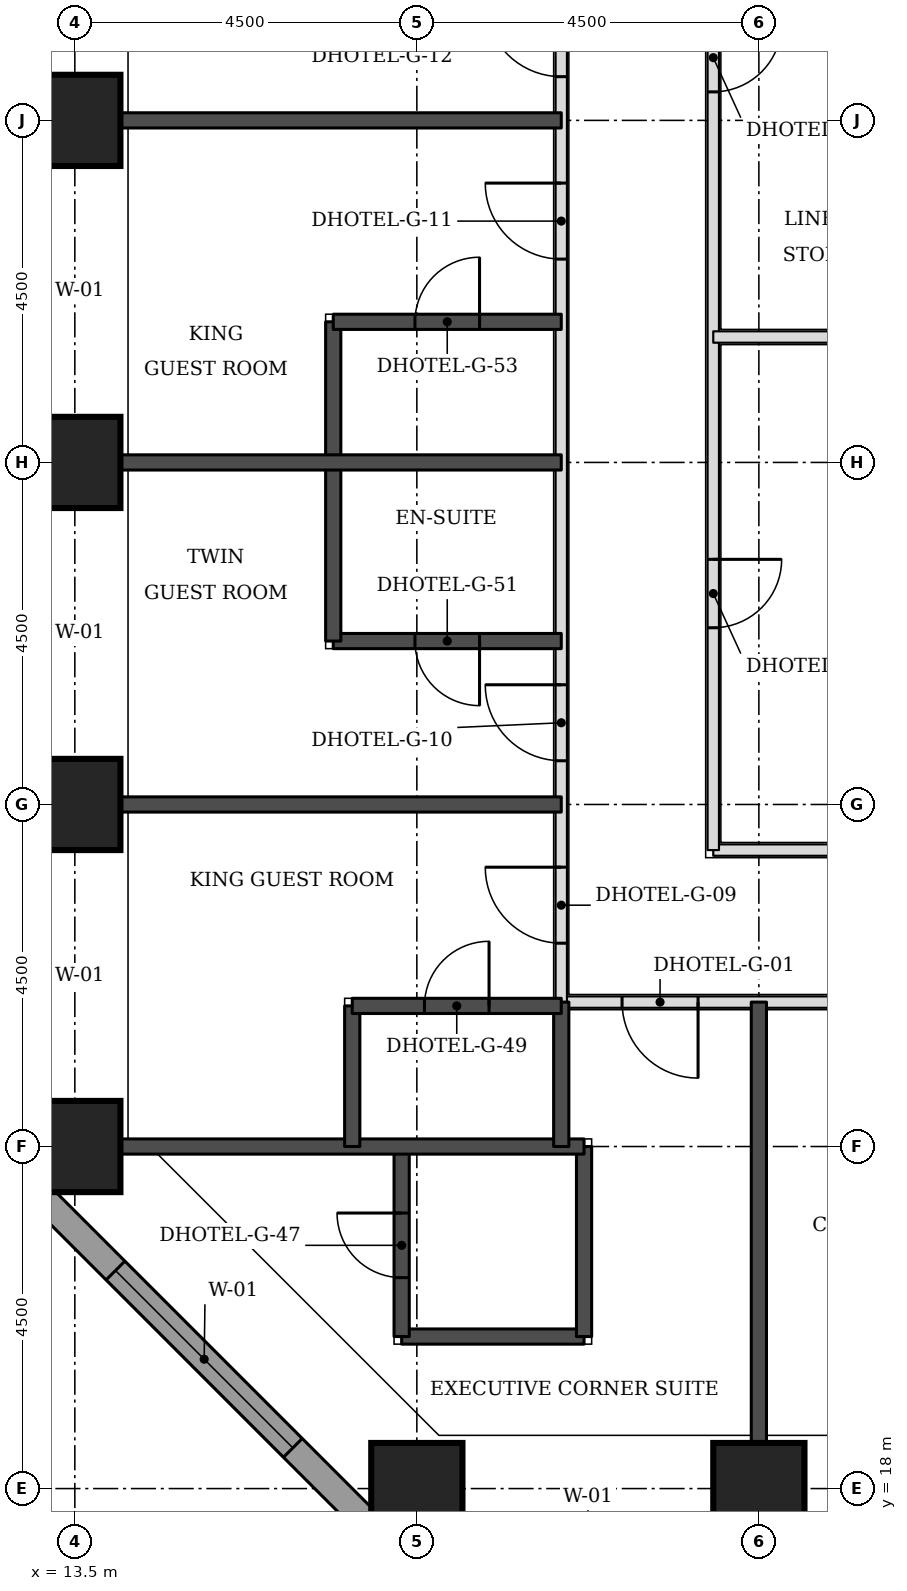
"""IFC4 building model, lengths in metres.
Left out: names, types, materials, properties, quantities, classifications, styles, units other than length and angle.
Written with IfcOpenShell. Run it as: python <this file> out.ifc"""

import sys

from ifc_helpers import new_model, si_unit, direction, frame, frame_2d, origin, origin_2d, place, context, subcontext, project, spatial, rectangle, extrude, element, fill, save


model = new_model("IFC4")
c1 = context("Model", 3, precision=1e-05, world=origin(), true_north=direction((0.0, 1.0)))
c2 = subcontext(c1, "Body", "Model", "MODEL_VIEW")
j1 = project(units=[si_unit("LENGTHUNIT", "METRE"), si_unit("PLANEANGLEUNIT", "RADIAN")], contexts=[c1])
p1 = place(None, origin())
s1 = spatial("IfcSite", under=j1, at=p1, CompositionType="ELEMENT")
p2 = place(p1, origin())
s2 = spatial("IfcBuilding", under=s1, at=p2, CompositionType="ELEMENT")
p3 = place(p2, frame((0.0, 0.0, 66.0)))
s3 = spatial("IfcBuildingStorey", under=s2, at=p3, CompositionType="ELEMENT", Elevation=66.0)
for number, where, z_axis, x_axis in (
    (1, (18.0, 18.0, 0.0), (0.0, 0.0, 1.0), (1.0, 0.0, 0.0)),
    (2, (22.5, 18.0, 0.0), (0.0, 0.0, 1.0), (1.0, 0.0, 0.0)),
    (3, (13.5, 22.5, 0.0), (0.0, 0.0, 1.0), (1.0, 0.0, 0.0)),
    (4, (13.5, 27.0, 0.0), (0.0, 0.0, 1.0), (1.0, 0.0, 0.0)),
    (5, (13.5, 31.5, 0.0), (0.0, 0.0, 1.0), (1.0, 0.0, 0.0)),
    (6, (13.5, 36.0, 0.0), (0.0, 0.0, 1.0), (1.0, 0.0, 0.0)),
):
    element("IfcColumn", number, at=place(p3, frame(where, z_axis=z_axis, x_axis=x_axis)), inside=s3, PredefinedType="COLUMN", context=c2, shape_type="SweptSolid", body=[
        extrude(rectangle(XDim=1.2, YDim=1.2, at=origin_2d()), origin(), (0.0, 0.0, 1.0), 3.3),
    ])
p4 = place(p3, frame((12.674, 22.23, 0.0), z_axis=(0.0, 0.0, 1.0), x_axis=(0.707106781187, -0.707106781187, 0.0)))
e7 = element("IfcWall", 7, at=p4, inside=s3, PredefinedType="STANDARD", context=c2, shape_type="SweptSolid", body=[
    extrude(rectangle(XDim=7.151, YDim=0.35, at=frame_2d((3.576, 0.0))), origin(), (0.0, 0.0, 1.0), 3.055),
])
p5 = place(p4, frame((1.926, 0.0, 0.8)))
e8 = element("IfcOpeningElement", 8, at=p5, cuts=e7, PredefinedType="OPENING", context=c2, shape_type="SweptSolid", body=[
    extrude(rectangle(XDim=3.3, YDim=1.5, at=frame_2d((1.65, 0.75))), frame((0.0, 0.185, 0.0), z_axis=(0.0, -1.0, 0.0), x_axis=(1.0, 0.0, 0.0)), (0.0, 0.0, 1.0), 0.37),
])
p6 = place(p3, frame((19.9, 24.4, 0.0), z_axis=(0.0, 0.0, 1.0), x_axis=(1.0, 0.0, 0.0)))
e9 = element("IfcWall", 9, at=p6, inside=s3, PredefinedType="PARTITIONING", context=c2, shape_type="SweptSolid", body=[
    extrude(rectangle(XDim=32.2, YDim=0.15, at=frame_2d((16.1, 0.0))), origin(), (0.0, 0.0, 1.0), 3.08),
])
p7 = place(p6, frame((4.4, 0.0, 0.0)))
e10 = element("IfcOpeningElement", 10, at=p7, cuts=e9, PredefinedType="OPENING", context=c2, shape_type="SweptSolid", body=[
    extrude(rectangle(XDim=0.9, YDim=2.1, at=frame_2d((0.45, 1.05))), frame((0.0, 0.085, 0.0), z_axis=(0.0, -1.0, 0.0), x_axis=(1.0, 0.0, 0.0)), (0.0, 0.0, 1.0), 0.17),
])
p8 = place(p6, frame((8.9, 0.0, 0.0)))
e11 = element("IfcOpeningElement", 11, at=p8, cuts=e9, PredefinedType="OPENING", context=c2, shape_type="SweptSolid", body=[
    extrude(rectangle(XDim=0.9, YDim=2.1, at=frame_2d((0.45, 1.05))), frame((0.0, 0.085, 0.0), z_axis=(0.0, -1.0, 0.0), x_axis=(1.0, 0.0, 0.0)), (0.0, 0.0, 1.0), 0.17),
])
p9 = place(p6, frame((13.4, 0.0, 0.0)))
e12 = element("IfcOpeningElement", 12, at=p9, cuts=e9, PredefinedType="OPENING", context=c2, shape_type="SweptSolid", body=[
    extrude(rectangle(XDim=0.9, YDim=2.1, at=frame_2d((0.45, 1.05))), frame((0.0, 0.085, 0.0), z_axis=(0.0, -1.0, 0.0), x_axis=(1.0, 0.0, 0.0)), (0.0, 0.0, 1.0), 0.17),
])
p10 = place(p6, frame((17.9, 0.0, 0.0)))
e13 = element("IfcOpeningElement", 13, at=p10, cuts=e9, PredefinedType="OPENING", context=c2, shape_type="SweptSolid", body=[
    extrude(rectangle(XDim=0.9, YDim=2.1, at=frame_2d((0.45, 1.05))), frame((0.0, 0.085, 0.0), z_axis=(0.0, -1.0, 0.0), x_axis=(1.0, 0.0, 0.0)), (0.0, 0.0, 1.0), 0.17),
])
p11 = place(p6, frame((22.4, 0.0, 0.0)))
e14 = element("IfcOpeningElement", 14, at=p11, cuts=e9, PredefinedType="OPENING", context=c2, shape_type="SweptSolid", body=[
    extrude(rectangle(XDim=0.9, YDim=2.1, at=frame_2d((0.45, 1.05))), frame((0.0, 0.085, 0.0), z_axis=(0.0, -1.0, 0.0), x_axis=(1.0, 0.0, 0.0)), (0.0, 0.0, 1.0), 0.17),
])
p12 = place(p6, frame((26.9, 0.0, 0.0)))
e15 = element("IfcOpeningElement", 15, at=p12, cuts=e9, PredefinedType="OPENING", context=c2, shape_type="SweptSolid", body=[
    extrude(rectangle(XDim=0.9, YDim=2.1, at=frame_2d((0.45, 1.05))), frame((0.0, 0.085, 0.0), z_axis=(0.0, -1.0, 0.0), x_axis=(1.0, 0.0, 0.0)), (0.0, 0.0, 1.0), 0.17),
])
p13 = place(p6, frame((0.8, 0.0, 0.0)))
e16 = element("IfcOpeningElement", 16, at=p13, cuts=e9, PredefinedType="OPENING", context=c2, shape_type="SweptSolid", body=[
    extrude(rectangle(XDim=1.0, YDim=2.1, at=frame_2d((0.5, 1.05))), frame((0.0, 0.085, 0.0), z_axis=(0.0, -1.0, 0.0), x_axis=(1.0, 0.0, 0.0)), (0.0, 0.0, 1.0), 0.17),
])
p14 = place(p6, frame((30.4, 0.0, 0.0)))
e17 = element("IfcOpeningElement", 17, at=p14, cuts=e9, PredefinedType="OPENING", context=c2, shape_type="SweptSolid", body=[
    extrude(rectangle(XDim=1.0, YDim=2.1, at=frame_2d((0.5, 1.05))), frame((0.0, 0.085, 0.0), z_axis=(0.0, -1.0, 0.0), x_axis=(1.0, 0.0, 0.0)), (0.0, 0.0, 1.0), 0.17),
])
p15 = place(p3, frame((19.9, 24.4, 0.0), z_axis=(0.0, 0.0, 1.0), x_axis=(0.0, 1.0, 0.0)))
e18 = element("IfcWall", 18, at=p15, inside=s3, PredefinedType="PARTITIONING", context=c2, shape_type="SweptSolid", body=[
    extrude(rectangle(XDim=25.1, YDim=0.15, at=frame_2d((12.55, 0.0))), origin(), (0.0, 0.0, 1.0), 3.08),
])
p16 = place(p15, frame((0.775, 0.0, 0.0)))
e19 = element("IfcOpeningElement", 19, at=p16, cuts=e18, PredefinedType="OPENING", context=c2, shape_type="SweptSolid", body=[
    extrude(rectangle(XDim=1.0, YDim=2.1, at=frame_2d((0.5, 1.05))), frame((0.0, 0.085, 0.0), z_axis=(0.0, -1.0, 0.0), x_axis=(1.0, 0.0, 0.0)), (0.0, 0.0, 1.0), 0.17),
])
p17 = place(p15, frame((3.175, 0.0, 0.0)))
e20 = element("IfcOpeningElement", 20, at=p17, cuts=e18, PredefinedType="OPENING", context=c2, shape_type="SweptSolid", body=[
    extrude(rectangle(XDim=1.0, YDim=2.1, at=frame_2d((0.5, 1.05))), frame((0.0, 0.085, 0.0), z_axis=(0.0, -1.0, 0.0), x_axis=(1.0, 0.0, 0.0)), (0.0, 0.0, 1.0), 0.17),
])
p18 = place(p15, frame((9.775, 0.0, 0.0)))
e21 = element("IfcOpeningElement", 21, at=p18, cuts=e18, PredefinedType="OPENING", context=c2, shape_type="SweptSolid", body=[
    extrude(rectangle(XDim=1.0, YDim=2.1, at=frame_2d((0.5, 1.05))), frame((0.0, 0.085, 0.0), z_axis=(0.0, -1.0, 0.0), x_axis=(1.0, 0.0, 0.0)), (0.0, 0.0, 1.0), 0.17),
])
p19 = place(p15, frame((12.175, 0.0, 0.0)))
e22 = element("IfcOpeningElement", 22, at=p19, cuts=e18, PredefinedType="OPENING", context=c2, shape_type="SweptSolid", body=[
    extrude(rectangle(XDim=1.0, YDim=2.1, at=frame_2d((0.5, 1.05))), frame((0.0, 0.085, 0.0), z_axis=(0.0, -1.0, 0.0), x_axis=(1.0, 0.0, 0.0)), (0.0, 0.0, 1.0), 0.17),
])
p20 = place(p15, frame((18.775, 0.0, 0.0)))
e23 = element("IfcOpeningElement", 23, at=p20, cuts=e18, PredefinedType="OPENING", context=c2, shape_type="SweptSolid", body=[
    extrude(rectangle(XDim=1.0, YDim=2.1, at=frame_2d((0.5, 1.05))), frame((0.0, 0.085, 0.0), z_axis=(0.0, -1.0, 0.0), x_axis=(1.0, 0.0, 0.0)), (0.0, 0.0, 1.0), 0.17),
])
p21 = place(p15, frame((21.175, 0.0, 0.0)))
e24 = element("IfcOpeningElement", 24, at=p21, cuts=e18, PredefinedType="OPENING", context=c2, shape_type="SweptSolid", body=[
    extrude(rectangle(XDim=1.0, YDim=2.1, at=frame_2d((0.5, 1.05))), frame((0.0, 0.085, 0.0), z_axis=(0.0, -1.0, 0.0), x_axis=(1.0, 0.0, 0.0)), (0.0, 0.0, 1.0), 0.17),
])
p22 = place(p3, frame((21.9, 26.4, 0.0), z_axis=(0.0, 0.0, 1.0), x_axis=(1.0, 0.0, 0.0)))
e25 = element("IfcWall", 25, at=p22, inside=s3, PredefinedType="PARTITIONING", context=c2, shape_type="SweptSolid", body=[
    extrude(rectangle(XDim=2.7, YDim=0.15, at=frame_2d((1.35, 0.0))), origin(), (0.0, 0.0, 1.0), 3.08),
])
p23 = place(p3, frame((21.9, 26.4, 0.0), z_axis=(0.0, 0.0, 1.0), x_axis=(0.0, 1.0, 0.0)))
e26 = element("IfcWall", 26, at=p23, inside=s3, PredefinedType="PARTITIONING", context=c2, shape_type="SweptSolid", body=[
    extrude(rectangle(XDim=16.6, YDim=0.15, at=frame_2d((8.3, 0.0))), origin(), (0.0, 0.0, 1.0), 3.08),
])
p24 = place(p23, frame((2.925, 0.0, 0.0)))
e27 = element("IfcOpeningElement", 27, at=p24, cuts=e26, PredefinedType="OPENING", context=c2, shape_type="SweptSolid", body=[
    extrude(rectangle(XDim=0.9, YDim=2.1, at=frame_2d((0.45, 1.05))), frame((0.0, 0.085, 0.0), z_axis=(0.0, -1.0, 0.0), x_axis=(1.0, 0.0, 0.0)), (0.0, 0.0, 1.0), 0.17),
])
p25 = place(p23, frame((9.975, 0.0, 0.0)))
e28 = element("IfcOpeningElement", 28, at=p25, cuts=e26, PredefinedType="OPENING", context=c2, shape_type="SweptSolid", body=[
    extrude(rectangle(XDim=0.9, YDim=2.1, at=frame_2d((0.45, 1.05))), frame((0.0, 0.085, 0.0), z_axis=(0.0, -1.0, 0.0), x_axis=(1.0, 0.0, 0.0)), (0.0, 0.0, 1.0), 0.17),
])
p26 = place(p3, frame((22.5, 18.6, 0.0), z_axis=(0.0, 0.0, 1.0), x_axis=(0.0, 1.0, 0.0)))
e29 = element("IfcWall", 29, at=p26, inside=s3, PredefinedType="SOLIDWALL", context=c2, shape_type="SweptSolid", body=[
    extrude(rectangle(XDim=5.8, YDim=0.2, at=frame_2d((2.9, 0.0))), origin(), (0.0, 0.0, 1.0), 3.08),
])
p27 = place(p3, frame((17.8, 20.0, 0.0), z_axis=(0.0, 0.0, 1.0), x_axis=(1.0, 0.0, 0.0)))
e30 = element("IfcWall", 30, at=p27, inside=s3, PredefinedType="SOLIDWALL", context=c2, shape_type="SweptSolid", body=[
    extrude(rectangle(XDim=2.4, YDim=0.2, at=frame_2d((1.2, 0.0))), origin(), (0.0, 0.0, 1.0), 3.08),
])
p28 = place(p3, frame((17.8, 20.0, 0.0), z_axis=(0.0, 0.0, 1.0), x_axis=(0.0, 1.0, 0.0)))
e31 = element("IfcWall", 31, at=p28, inside=s3, PredefinedType="SOLIDWALL", context=c2, shape_type="SweptSolid", body=[
    extrude(rectangle(XDim=2.5, YDim=0.2, at=frame_2d((1.25, 0.0))), origin(), (0.0, 0.0, 1.0), 3.08),
])
p29 = place(p28, frame((0.775, 0.0, 0.0)))
e32 = element("IfcOpeningElement", 32, at=p29, cuts=e31, PredefinedType="OPENING", context=c2, shape_type="SweptSolid", body=[
    extrude(rectangle(XDim=0.85, YDim=2.1, at=frame_2d((0.425, 1.05))), frame((0.0, 0.11, 0.0), z_axis=(0.0, -1.0, 0.0), x_axis=(1.0, 0.0, 0.0)), (0.0, 0.0, 1.0), 0.22),
])
p30 = place(p3, frame((20.2, 20.0, 0.0), z_axis=(0.0, 0.0, 1.0), x_axis=(0.0, 1.0, 0.0)))
e33 = element("IfcWall", 33, at=p30, inside=s3, PredefinedType="SOLIDWALL", context=c2, shape_type="SweptSolid", body=[
    extrude(rectangle(XDim=2.5, YDim=0.2, at=frame_2d((1.25, 0.0))), origin(), (0.0, 0.0, 1.0), 3.08),
])
p31 = place(p3, frame((14.1, 22.5, 0.0), z_axis=(0.0, 0.0, 1.0), x_axis=(1.0, 0.0, 0.0)))
e34 = element("IfcWall", 34, at=p31, inside=s3, PredefinedType="SOLIDWALL", context=c2, shape_type="SweptSolid", body=[
    extrude(rectangle(XDim=6.1, YDim=0.2, at=frame_2d((3.05, 0.0))), origin(), (0.0, 0.0, 1.0), 3.08),
])
p32 = place(p3, frame((17.15, 22.5, 0.0), z_axis=(0.0, 0.0, 1.0), x_axis=(0.0, 1.0, 0.0)))
e35 = element("IfcWall", 35, at=p32, inside=s3, PredefinedType="SOLIDWALL", context=c2, shape_type="SweptSolid", body=[
    extrude(rectangle(XDim=1.85, YDim=0.2, at=frame_2d((0.925, 0.0))), origin(), (0.0, 0.0, 1.0), 3.08),
])
p33 = place(p3, frame((19.9, 22.5, 0.0), z_axis=(0.0, 0.0, 1.0), x_axis=(0.0, 1.0, 0.0)))
e36 = element("IfcWall", 36, at=p33, inside=s3, PredefinedType="SOLIDWALL", context=c2, shape_type="SweptSolid", body=[
    extrude(rectangle(XDim=1.9, YDim=0.2, at=frame_2d((0.95, 0.0))), origin(), (0.0, 0.0, 1.0), 3.08),
])
p34 = place(p3, frame((17.15, 24.35, 0.0), z_axis=(0.0, 0.0, 1.0), x_axis=(1.0, 0.0, 0.0)))
e37 = element("IfcWall", 37, at=p34, inside=s3, PredefinedType="SOLIDWALL", context=c2, shape_type="SweptSolid", body=[
    extrude(rectangle(XDim=2.75, YDim=0.2, at=frame_2d((1.375, 0.0))), origin(), (0.0, 0.0, 1.0), 3.08),
])
p35 = place(p34, frame((0.95, 0.0, 0.0)))
e38 = element("IfcOpeningElement", 38, at=p35, cuts=e37, PredefinedType="OPENING", context=c2, shape_type="SweptSolid", body=[
    extrude(rectangle(XDim=0.85, YDim=2.1, at=frame_2d((0.425, 1.05))), frame((0.0, 0.11, 0.0), z_axis=(0.0, -1.0, 0.0), x_axis=(1.0, 0.0, 0.0)), (0.0, 0.0, 1.0), 0.22),
])
p36 = place(p3, frame((14.1, 27.0, 0.0), z_axis=(0.0, 0.0, 1.0), x_axis=(1.0, 0.0, 0.0)))
e39 = element("IfcWall", 39, at=p36, inside=s3, PredefinedType="SOLIDWALL", context=c2, shape_type="SweptSolid", body=[
    extrude(rectangle(XDim=5.8, YDim=0.2, at=frame_2d((2.9, 0.0))), origin(), (0.0, 0.0, 1.0), 3.08),
])
p37 = place(p3, frame((16.9, 29.15, 0.0), z_axis=(0.0, 0.0, 1.0), x_axis=(1.0, 0.0, 0.0)))
e40 = element("IfcWall", 40, at=p37, inside=s3, PredefinedType="SOLIDWALL", context=c2, shape_type="SweptSolid", body=[
    extrude(rectangle(XDim=3.0, YDim=0.2, at=frame_2d((1.5, 0.0))), origin(), (0.0, 0.0, 1.0), 3.08),
])
p38 = place(p37, frame((1.075, 0.0, 0.0)))
e41 = element("IfcOpeningElement", 41, at=p38, cuts=e40, PredefinedType="OPENING", context=c2, shape_type="SweptSolid", body=[
    extrude(rectangle(XDim=0.85, YDim=2.1, at=frame_2d((0.425, 1.05))), frame((0.0, 0.11, 0.0), z_axis=(0.0, -1.0, 0.0), x_axis=(1.0, 0.0, 0.0)), (0.0, 0.0, 1.0), 0.22),
])
p39 = place(p3, frame((16.9, 29.15, 0.0), z_axis=(0.0, 0.0, 1.0), x_axis=(0.0, 1.0, 0.0)))
e42 = element("IfcWall", 42, at=p39, inside=s3, PredefinedType="SOLIDWALL", context=c2, shape_type="SweptSolid", body=[
    extrude(rectangle(XDim=4.2, YDim=0.2, at=frame_2d((2.1, 0.0))), origin(), (0.0, 0.0, 1.0), 3.08),
])
p40 = place(p3, frame((14.1, 31.5, 0.0), z_axis=(0.0, 0.0, 1.0), x_axis=(1.0, 0.0, 0.0)))
e43 = element("IfcWall", 43, at=p40, inside=s3, PredefinedType="SOLIDWALL", context=c2, shape_type="SweptSolid", body=[
    extrude(rectangle(XDim=5.8, YDim=0.2, at=frame_2d((2.9, 0.0))), origin(), (0.0, 0.0, 1.0), 3.08),
])
p41 = place(p3, frame((16.9, 33.35, 0.0), z_axis=(0.0, 0.0, 1.0), x_axis=(1.0, 0.0, 0.0)))
e44 = element("IfcWall", 44, at=p41, inside=s3, PredefinedType="SOLIDWALL", context=c2, shape_type="SweptSolid", body=[
    extrude(rectangle(XDim=3.0, YDim=0.2, at=frame_2d((1.5, 0.0))), origin(), (0.0, 0.0, 1.0), 3.08),
])
p42 = place(p41, frame((1.075, 0.0, 0.0)))
e45 = element("IfcOpeningElement", 45, at=p42, cuts=e44, PredefinedType="OPENING", context=c2, shape_type="SweptSolid", body=[
    extrude(rectangle(XDim=0.85, YDim=2.1, at=frame_2d((0.425, 1.05))), frame((0.0, 0.11, 0.0), z_axis=(0.0, -1.0, 0.0), x_axis=(1.0, 0.0, 0.0)), (0.0, 0.0, 1.0), 0.22),
])
p43 = place(p3, frame((14.1, 36.0, 0.0), z_axis=(0.0, 0.0, 1.0), x_axis=(1.0, 0.0, 0.0)))
e46 = element("IfcWall", 46, at=p43, inside=s3, PredefinedType="SOLIDWALL", context=c2, shape_type="SweptSolid", body=[
    extrude(rectangle(XDim=5.8, YDim=0.2, at=frame_2d((2.9, 0.0))), origin(), (0.0, 0.0, 1.0), 3.08),
])
p44 = place(p3, frame((21.9, 33.15, 0.0), z_axis=(0.0, 0.0, 1.0), x_axis=(1.0, 0.0, 0.0)))
e47 = element("IfcWall", 47, at=p44, inside=s3, PredefinedType="PARTITIONING", context=c2, shape_type="SweptSolid", body=[
    extrude(rectangle(XDim=2.7, YDim=0.15, at=frame_2d((1.35, 0.0))), origin(), (0.0, 0.0, 1.0), 3.08),
])
p45 = place(p5, origin())
e48 = element("IfcWindow", 48, at=p45, inside=s3, PartitioningType="SINGLE_PANEL", PredefinedType="WINDOW", context=c2, shape_type="SweptSolid", body=[
    extrude(rectangle(XDim=3.3, YDim=1.5, at=frame_2d((1.65, 0.75))), frame((0.0, 0.085, 0.0), z_axis=(0.0, -1.0, 0.0), x_axis=(1.0, 0.0, 0.0)), (0.0, 0.0, 1.0), 0.06),
])
fill(e8, e48)
p46 = place(p16, origin())
e49 = element("IfcDoor", 49, at=p46, inside=s3, OperationType="SINGLE_SWING_RIGHT", PredefinedType="DOOR", context=c2, shape_type="SweptSolid", body=[
    extrude(rectangle(XDim=1.0, YDim=2.1, at=frame_2d((0.5, 1.05))), frame((0.0, 0.025, 0.0), z_axis=(0.0, -1.0, 0.0), x_axis=(1.0, 0.0, 0.0)), (0.0, 0.0, 1.0), 0.05),
])
fill(e19, e49)
p47 = place(p35, origin())
e50 = element("IfcDoor", 50, at=p47, inside=s3, OperationType="SINGLE_SWING_RIGHT", PredefinedType="DOOR", context=c2, shape_type="SweptSolid", body=[
    extrude(rectangle(XDim=0.85, YDim=2.1, at=frame_2d((0.425, 1.05))), frame((0.0, 0.025, 0.0), z_axis=(0.0, -1.0, 0.0), x_axis=(1.0, 0.0, 0.0)), (0.0, 0.0, 1.0), 0.05),
])
fill(e38, e50)
p48 = place(p17, origin())
e51 = element("IfcDoor", 51, at=p48, inside=s3, OperationType="SINGLE_SWING_RIGHT", PredefinedType="DOOR", context=c2, shape_type="SweptSolid", body=[
    extrude(rectangle(XDim=1.0, YDim=2.1, at=frame_2d((0.5, 1.05))), frame((0.0, 0.025, 0.0), z_axis=(0.0, -1.0, 0.0), x_axis=(1.0, 0.0, 0.0)), (0.0, 0.0, 1.0), 0.05),
])
fill(e20, e51)
p49 = place(p38, frame((0.85, 0.0, 0.0), z_axis=(0.0, 0.0, 1.0), x_axis=(-1.0, 0.0, 0.0)))
e52 = element("IfcDoor", 52, at=p49, inside=s3, OperationType="SINGLE_SWING_LEFT", PredefinedType="DOOR", context=c2, shape_type="SweptSolid", body=[
    extrude(rectangle(XDim=0.85, YDim=2.1, at=frame_2d((0.425, 1.05))), frame((0.0, 0.025, 0.0), z_axis=(0.0, -1.0, 0.0), x_axis=(1.0, 0.0, 0.0)), (0.0, 0.0, 1.0), 0.05),
])
fill(e41, e52)
p50 = place(p18, origin())
e53 = element("IfcDoor", 53, at=p50, inside=s3, OperationType="SINGLE_SWING_RIGHT", PredefinedType="DOOR", context=c2, shape_type="SweptSolid", body=[
    extrude(rectangle(XDim=1.0, YDim=2.1, at=frame_2d((0.5, 1.05))), frame((0.0, 0.025, 0.0), z_axis=(0.0, -1.0, 0.0), x_axis=(1.0, 0.0, 0.0)), (0.0, 0.0, 1.0), 0.05),
])
fill(e21, e53)
p51 = place(p42, origin())
e54 = element("IfcDoor", 54, at=p51, inside=s3, OperationType="SINGLE_SWING_RIGHT", PredefinedType="DOOR", context=c2, shape_type="SweptSolid", body=[
    extrude(rectangle(XDim=0.85, YDim=2.1, at=frame_2d((0.425, 1.05))), frame((0.0, 0.025, 0.0), z_axis=(0.0, -1.0, 0.0), x_axis=(1.0, 0.0, 0.0)), (0.0, 0.0, 1.0), 0.05),
])
fill(e45, e54)
p52 = place(p19, origin())
e55 = element("IfcDoor", 55, at=p52, inside=s3, OperationType="SINGLE_SWING_RIGHT", PredefinedType="DOOR", context=c2, shape_type="SweptSolid", body=[
    extrude(rectangle(XDim=1.0, YDim=2.1, at=frame_2d((0.5, 1.05))), frame((0.0, 0.025, 0.0), z_axis=(0.0, -1.0, 0.0), x_axis=(1.0, 0.0, 0.0)), (0.0, 0.0, 1.0), 0.05),
])
fill(e22, e55)
p53 = place(p13, frame((1.0, 0.0, 0.0), z_axis=(0.0, 0.0, 1.0), x_axis=(-1.0, 0.0, 0.0)))
e56 = element("IfcDoor", 56, at=p53, inside=s3, OperationType="SINGLE_SWING_LEFT", PredefinedType="DOOR", context=c2, shape_type="SweptSolid", body=[
    extrude(rectangle(XDim=1.0, YDim=2.1, at=frame_2d((0.5, 1.05))), frame((0.0, 0.025, 0.0), z_axis=(0.0, -1.0, 0.0), x_axis=(1.0, 0.0, 0.0)), (0.0, 0.0, 1.0), 0.05),
])
fill(e16, e56)
p54 = place(p29, origin())
e57 = element("IfcDoor", 57, at=p54, inside=s3, OperationType="SINGLE_SWING_RIGHT", PredefinedType="DOOR", context=c2, shape_type="SweptSolid", body=[
    extrude(rectangle(XDim=0.85, YDim=2.1, at=frame_2d((0.425, 1.05))), frame((0.0, 0.025, 0.0), z_axis=(0.0, -1.0, 0.0), x_axis=(1.0, 0.0, 0.0)), (0.0, 0.0, 1.0), 0.05),
])
fill(e32, e57)
p55 = place(p24, frame((0.9, 0.0, 0.0), z_axis=(0.0, 0.0, 1.0), x_axis=(-1.0, 0.0, 0.0)))
e58 = element("IfcDoor", 58, at=p55, inside=s3, OperationType="SINGLE_SWING_LEFT", PredefinedType="DOOR", context=c2, shape_type="SweptSolid", body=[
    extrude(rectangle(XDim=0.9, YDim=2.1, at=frame_2d((0.45, 1.05))), frame((0.0, 0.025, 0.0), z_axis=(0.0, -1.0, 0.0), x_axis=(1.0, 0.0, 0.0)), (0.0, 0.0, 1.0), 0.05),
])
fill(e27, e58)
p56 = place(p25, frame((0.9, 0.0, 0.0), z_axis=(0.0, 0.0, 1.0), x_axis=(-1.0, 0.0, 0.0)))
e59 = element("IfcDoor", 59, at=p56, inside=s3, OperationType="SINGLE_SWING_LEFT", PredefinedType="DOOR", context=c2, shape_type="SweptSolid", body=[
    extrude(rectangle(XDim=0.9, YDim=2.1, at=frame_2d((0.45, 1.05))), frame((0.0, 0.025, 0.0), z_axis=(0.0, -1.0, 0.0), x_axis=(1.0, 0.0, 0.0)), (0.0, 0.0, 1.0), 0.05),
])
fill(e28, e59)
save(model, sys.argv[1])
